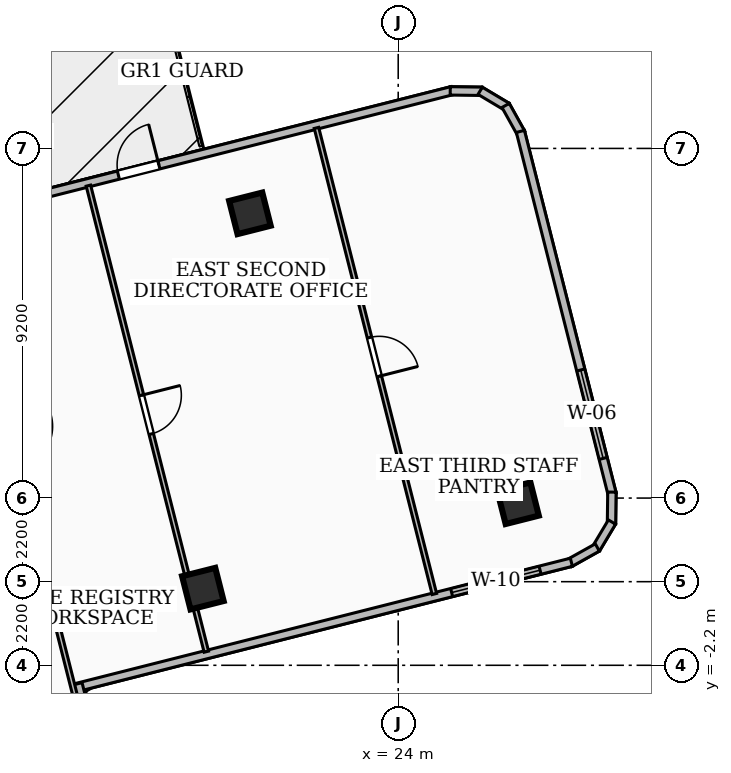
"""IFC4 building model, lengths in metres.
Left out: names, types, materials, properties, quantities, classifications, styles, units other than length and angle.
Written with IfcOpenShell. Run it as: python <this file> out.ifc"""

import sys

from ifc_helpers import new_model, si_unit, direction, frame, frame_2d, origin, origin_2d, place, context, subcontext, project, spatial, rectangle, extrude, element, fill, save


model = new_model("IFC4")
c1 = context("Model", 3, precision=1e-05, world=origin(), true_north=direction((0.0, 1.0)))
c2 = subcontext(c1, "Body", "Model", "MODEL_VIEW")
j1 = project(units=[si_unit("LENGTHUNIT", "METRE"), si_unit("PLANEANGLEUNIT", "RADIAN")], contexts=[c1])
p1 = place(None, origin())
s1 = spatial("IfcSite", under=j1, at=p1, CompositionType="ELEMENT")
p2 = place(p1, origin())
s2 = spatial("IfcBuilding", under=s1, at=p2, CompositionType="ELEMENT")
p3 = place(p2, frame((0.0, 0.0, 130.68)))
s3 = spatial("IfcBuildingStorey", under=s2, at=p3, CompositionType="ELEMENT", Elevation=130.68)
for number, where, z_axis, x_axis in (
    (1, (18.86, -0.183, 0.0), (0.0, 0.0, 1.0), (0.969, 0.245, 0.0)),
    (2, (27.153, 2.064, 0.0), (0.0, 0.0, 1.0), (0.969, 0.245, 0.0)),
    (3, (20.098, 9.692, 0.0), (0.0, 0.0, 1.0), (0.969, 0.245, 0.0)),
):
    element("IfcColumn", number, at=place(p3, frame(where, z_axis=z_axis, x_axis=x_axis)), inside=s3, PredefinedType="COLUMN", context=c2, shape_type="SweptSolid", body=[
        extrude(rectangle(XDim=0.9, YDim=0.9, at=origin_2d()), origin(), (0.0, 0.0, 1.0), 3.6),
    ])
p4 = place(p3, frame((12.371, 9.618, 0.0), z_axis=(0.0, 0.0, 1.0), x_axis=(0.969434127448, 0.245351732293, 0.0)))
e4 = element("IfcWall", 4, at=p4, inside=s3, PredefinedType="SOLIDWALL", context=c2, shape_type="SweptSolid", body=[
    extrude(rectangle(XDim=13.458, YDim=0.22, at=frame_2d((6.729, 0.0))), origin(), (0.0, 0.0, 1.0), 3.32),
])
p5 = place(p4, frame((4.4, 0.0, 0.0)))
e5 = element("IfcOpeningElement", 5, at=p5, cuts=e4, PredefinedType="OPENING", context=c2, shape_type="SweptSolid", body=[
    extrude(rectangle(XDim=1.1, YDim=2.1, at=frame_2d((0.55, 1.05))), frame((0.0, 0.12, 0.0), z_axis=(0.0, -1.0, 0.0), x_axis=(1.0, 0.0, 0.0)), (0.0, 0.0, 1.0), 0.24),
])
p6 = place(p3, frame((25.369, 12.914, 0.0), z_axis=(0.0, 0.0, 1.0), x_axis=(0.999913243347, -0.013172159236, 0.0)))
e6 = element("IfcWall", 6, at=p6, inside=s3, PredefinedType="SOLIDWALL", context=c2, shape_type="SweptSolid", body=[
    extrude(rectangle(XDim=0.834, YDim=0.22, at=frame_2d((0.417, 0.0))), origin(), (0.0, 0.0, 1.0), 3.32),
])
p7 = place(p3, frame((26.157, 12.916, 0.0), z_axis=(0.0, 0.0, 1.0), x_axis=(0.858543269067, -0.512741119026, 0.0)))
e7 = element("IfcWall", 7, at=p7, inside=s3, PredefinedType="SOLIDWALL", context=c2, shape_type="SweptSolid", body=[
    extrude(rectangle(XDim=0.819, YDim=0.22, at=frame_2d((0.41, 0.0))), origin(), (0.0, 0.0, 1.0), 3.32),
])
p8 = place(p3, frame((26.827, 12.531, 0.0), z_axis=(0.0, 0.0, 1.0), x_axis=(0.486561807946, -0.873646156661, 0.0)))
e8 = element("IfcWall", 8, at=p8, inside=s3, PredefinedType="SOLIDWALL", context=c2, shape_type="SweptSolid", body=[
    extrude(rectangle(XDim=0.834, YDim=0.22, at=frame_2d((0.417, 0.0))), origin(), (0.0, 0.0, 1.0), 3.32),
])
p9 = place(p3, frame((27.215, 11.848, 0.0), z_axis=(0.0, 0.0, 1.0), x_axis=(0.245295842673, -0.969448270702, 0.0)))
e9 = element("IfcWall", 9, at=p9, inside=s3, PredefinedType="SOLIDWALL", context=c2, shape_type="SweptSolid", body=[
    extrude(rectangle(XDim=9.84, YDim=0.22, at=frame_2d((4.92, 0.0))), origin(), (0.0, 0.0, 1.0), 3.32),
])
p10 = place(p9, frame((6.476, 0.0, 0.85)))
e10 = element("IfcOpeningElement", 10, at=p10, cuts=e9, PredefinedType="OPENING", context=c2, shape_type="SweptSolid", body=[
    extrude(rectangle(XDim=2.4, YDim=1.85, at=frame_2d((1.2, 0.925))), frame((0.0, 0.12, 0.0), z_axis=(0.0, -1.0, 0.0), x_axis=(1.0, 0.0, 0.0)), (0.0, 0.0, 1.0), 0.24),
])
p11 = place(p3, frame((29.623, 2.357, 0.0), z_axis=(0.0, 0.0, 1.0), x_axis=(-0.013172159236, -0.999913243347, 0.0)))
e11 = element("IfcWall", 11, at=p11, inside=s3, PredefinedType="SOLIDWALL", context=c2, shape_type="SweptSolid", body=[
    extrude(rectangle(XDim=0.834, YDim=0.22, at=frame_2d((0.417, 0.0))), origin(), (0.0, 0.0, 1.0), 3.32),
])
p12 = place(p3, frame((29.625, 1.569, 0.0), z_axis=(0.0, 0.0, 1.0), x_axis=(-0.513266477087, -0.858229295409, 0.0)))
e12 = element("IfcWall", 12, at=p12, inside=s3, PredefinedType="SOLIDWALL", context=c2, shape_type="SweptSolid", body=[
    extrude(rectangle(XDim=0.818, YDim=0.22, at=frame_2d((0.409, 0.0))), origin(), (0.0, 0.0, 1.0), 3.32),
])
p13 = place(p3, frame((29.24, 0.9, 0.0), z_axis=(0.0, 0.0, 1.0), x_axis=(-0.873148499647, -0.487454303052, 0.0)))
e13 = element("IfcWall", 13, at=p13, inside=s3, PredefinedType="SOLIDWALL", context=c2, shape_type="SweptSolid", body=[
    extrude(rectangle(XDim=0.835, YDim=0.22, at=frame_2d((0.417, 0.0))), origin(), (0.0, 0.0, 1.0), 3.32),
])
p14 = place(p3, frame((28.557, 0.511, 0.0), z_axis=(0.0, 0.0, 1.0), x_axis=(-0.969429758912, -0.245368992613, 0.0)))
e14 = element("IfcWall", 14, at=p14, inside=s3, PredefinedType="SOLIDWALL", context=c2, shape_type="SweptSolid", body=[
    extrude(rectangle(XDim=13.457, YDim=0.22, at=frame_2d((6.729, 0.0))), origin(), (0.0, 0.0, 1.0), 3.32),
])
p15 = place(p14, frame((0.85, 0.0, 0.85)))
e15 = element("IfcOpeningElement", 15, at=p15, cuts=e14, PredefinedType="OPENING", context=c2, shape_type="SweptSolid", body=[
    extrude(rectangle(XDim=2.4, YDim=1.65, at=frame_2d((1.2, 0.825))), frame((0.0, 0.12, 0.0), z_axis=(0.0, -1.0, 0.0), x_axis=(1.0, 0.0, 0.0)), (0.0, 0.0, 1.0), 0.24),
])
p16 = place(p3, frame((15.574, -2.684, 0.0), z_axis=(0.0, 0.0, 1.0), x_axis=(0.245346347134, -0.969435490349, 0.0)))
e16 = element("IfcWall", 16, at=p16, inside=s3, PredefinedType="SOLIDWALL", context=c2, shape_type="SweptSolid", body=[
    extrude(rectangle(XDim=6.538, YDim=0.22, at=frame_2d((3.269, 0.0))), origin(), (0.0, 0.0, 1.0), 3.32),
])
p17 = place(p3, frame((11.342, 13.433, 0.0), z_axis=(0.0, 0.0, 1.0), x_axis=(0.24525085526, -0.969459652587, 0.0)))
e17 = element("IfcWall", 17, at=p17, inside=s3, PredefinedType="PARTITIONING", context=c2, shape_type="SweptSolid", body=[
    extrude(rectangle(XDim=20.261, YDim=0.12, at=frame_2d((10.13, 0.0))), origin(), (0.0, 0.0, 1.0), 2.55),
])
p18 = place(p17, frame((9.64, 0.0, 0.0)))
e18 = element("IfcOpeningElement", 18, at=p18, cuts=e17, PredefinedType="OPENING", context=c2, shape_type="SweptSolid", body=[
    extrude(rectangle(XDim=1.2, YDim=2.1, at=frame_2d((0.6, 1.05))), frame((0.0, 0.07, 0.0), z_axis=(0.0, -1.0, 0.0), x_axis=(1.0, 0.0, 0.0)), (0.0, 0.0, 1.0), 0.14),
])
p19 = place(p3, frame((15.848, 10.421, 0.0), z_axis=(0.0, 0.0, 1.0), x_axis=(0.24530936383, -0.969444849394, 0.0)))
e19 = element("IfcWall", 19, at=p19, inside=s3, PredefinedType="PARTITIONING", context=c2, shape_type="SweptSolid", body=[
    extrude(rectangle(XDim=12.649, YDim=0.12, at=frame_2d((6.325, 0.0))), origin(), (0.0, 0.0, 1.0), 2.55),
])
p20 = place(p19, frame((5.69, 0.0, 0.0)))
e20 = element("IfcOpeningElement", 20, at=p20, cuts=e19, PredefinedType="OPENING", context=c2, shape_type="SweptSolid", body=[
    extrude(rectangle(XDim=1.05, YDim=2.08, at=frame_2d((0.525, 1.04))), frame((0.0, 0.07, 0.0), z_axis=(0.0, -1.0, 0.0), x_axis=(1.0, 0.0, 0.0)), (0.0, 0.0, 1.0), 0.14),
])
p21 = place(p3, frame((21.849, 11.94, 0.0), z_axis=(0.0, 0.0, 1.0), x_axis=(0.245272867445, -0.969454083748, 0.0)))
e21 = element("IfcWall", 21, at=p21, inside=s3, PredefinedType="PARTITIONING", context=c2, shape_type="SweptSolid", body=[
    extrude(rectangle(XDim=12.65, YDim=0.12, at=frame_2d((6.325, 0.0))), origin(), (0.0, 0.0, 1.0), 2.55),
])
p22 = place(p21, frame((5.69, 0.0, 0.0)))
e22 = element("IfcOpeningElement", 22, at=p22, cuts=e21, PredefinedType="OPENING", context=c2, shape_type="SweptSolid", body=[
    extrude(rectangle(XDim=1.05, YDim=2.08, at=frame_2d((0.525, 1.04))), frame((0.0, 0.07, 0.0), z_axis=(0.0, -1.0, 0.0), x_axis=(1.0, 0.0, 0.0)), (0.0, 0.0, 1.0), 0.14),
])
p23 = place(p5, origin())
e23 = element("IfcDoor", 23, at=p23, inside=s3, OperationType="SINGLE_SWING_RIGHT", PredefinedType="DOOR", context=c2, shape_type="SweptSolid", body=[
    extrude(rectangle(XDim=1.1, YDim=2.1, at=frame_2d((0.55, 1.05))), frame((0.0, 0.025, 0.0), z_axis=(0.0, -1.0, 0.0), x_axis=(1.0, 0.0, 0.0)), (0.0, 0.0, 1.0), 0.05),
])
fill(e5, e23)
p24 = place(p10, origin())
e24 = element("IfcWindow", 24, at=p24, inside=s3, PartitioningType="SINGLE_PANEL", PredefinedType="WINDOW", context=c2, shape_type="SweptSolid", body=[
    extrude(rectangle(XDim=2.4, YDim=1.85, at=frame_2d((1.2, 0.925))), frame((0.0, 0.03, 0.0), z_axis=(0.0, -1.0, 0.0), x_axis=(1.0, 0.0, 0.0)), (0.0, 0.0, 1.0), 0.06),
])
fill(e10, e24)
p25 = place(p15, origin())
e25 = element("IfcWindow", 25, at=p25, inside=s3, PartitioningType="SINGLE_PANEL", PredefinedType="WINDOW", context=c2, shape_type="SweptSolid", body=[
    extrude(rectangle(XDim=2.4, YDim=1.65, at=frame_2d((1.2, 0.825))), frame((0.0, 0.03, 0.0), z_axis=(0.0, -1.0, 0.0), x_axis=(1.0, 0.0, 0.0)), (0.0, 0.0, 1.0), 0.06),
])
fill(e15, e25)
p26 = place(p20, origin())
e26 = element("IfcDoor", 26, at=p26, inside=s3, OperationType="SINGLE_SWING_LEFT", PredefinedType="DOOR", context=c2, shape_type="SweptSolid", body=[
    extrude(rectangle(XDim=1.05, YDim=2.08, at=frame_2d((0.525, 1.04))), frame((0.0, 0.025, 0.0), z_axis=(0.0, -1.0, 0.0), x_axis=(1.0, 0.0, 0.0)), (0.0, 0.0, 1.0), 0.05),
])
fill(e20, e26)
p27 = place(p22, origin())
e27 = element("IfcDoor", 27, at=p27, inside=s3, OperationType="SINGLE_SWING_RIGHT", PredefinedType="DOOR", context=c2, shape_type="SweptSolid", body=[
    extrude(rectangle(XDim=1.05, YDim=2.08, at=frame_2d((0.525, 1.04))), frame((0.0, 0.025, 0.0), z_axis=(0.0, -1.0, 0.0), x_axis=(1.0, 0.0, 0.0)), (0.0, 0.0, 1.0), 0.05),
])
fill(e22, e27)
save(model, sys.argv[1])
